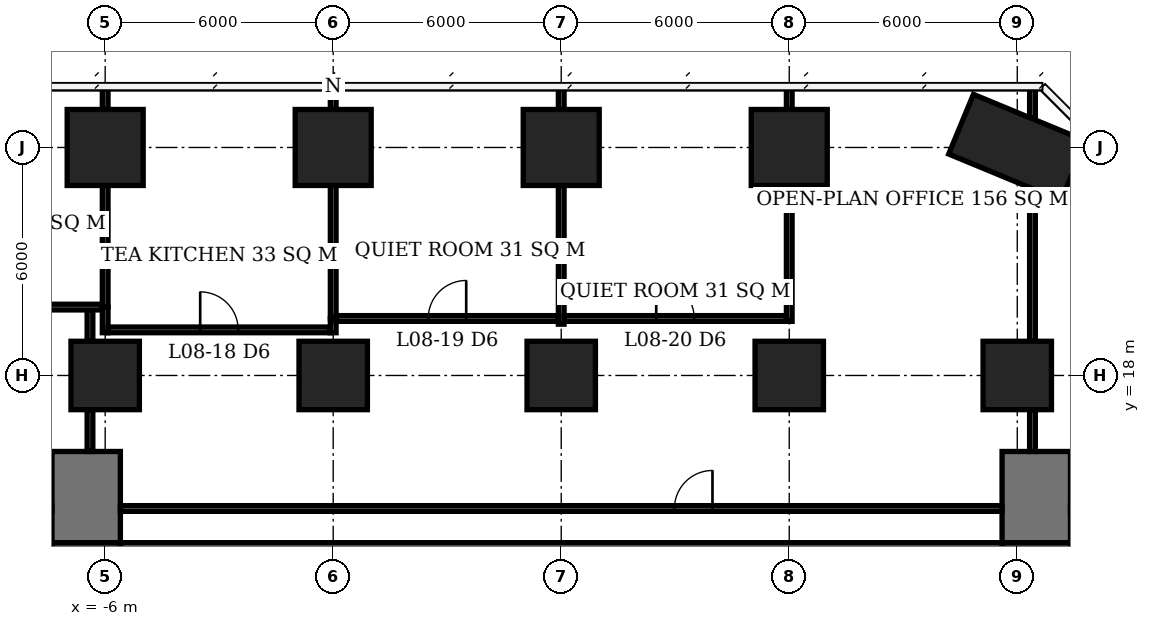
"""IFC4 building model, lengths in metres.
Left out: names, types, materials, properties, quantities, classifications, styles, units other than length and angle.
Written with IfcOpenShell. Run it as: python <this file> out.ifc"""

import sys

from ifc_helpers import new_model, si_unit, direction, frame, frame_2d, origin, origin_2d, place, context, subcontext, project, spatial, rectangle, extrude, element, fill, save


model = new_model("IFC4")
c1 = context("Model", 3, precision=1e-05, world=origin(), true_north=direction((0.0, 1.0)))
c2 = subcontext(c1, "Body", "Model", "MODEL_VIEW")
j1 = project(units=[si_unit("LENGTHUNIT", "METRE"), si_unit("PLANEANGLEUNIT", "RADIAN")], contexts=[c1])
p1 = place(None, origin())
s1 = spatial("IfcSite", under=j1, at=p1, CompositionType="ELEMENT")
p2 = place(p1, origin())
s2 = spatial("IfcBuilding", under=s1, at=p2, CompositionType="ELEMENT")
p3 = place(p2, frame((0.0, 0.0, 37.7)))
s3 = spatial("IfcBuildingStorey", under=s2, at=p3, CompositionType="ELEMENT", Elevation=37.7)
p4 = place(p3, frame((-6.0, 18.0, 0.0), z_axis=(0.0, 0.0, 1.0), x_axis=(1.0, 0.0, 0.0)))
e1 = element("IfcColumn", 1, at=p4, inside=s3, PredefinedType="COLUMN", context=c2, shape_type="SweptSolid", body=[
    extrude(rectangle(XDim=1.8, YDim=1.8, at=origin_2d()), origin(), (0.0, 0.0, 1.0), 3.9),
])
p5 = place(p3, frame((-6.0, 24.0, 0.0), z_axis=(0.0, 0.0, 1.0), x_axis=(1.0, 0.0, 0.0)))
e2 = element("IfcColumn", 2, at=p5, inside=s3, PredefinedType="COLUMN", context=c2, shape_type="SweptSolid", body=[
    extrude(rectangle(XDim=2.0, YDim=2.0, at=origin_2d()), origin(), (0.0, 0.0, 1.0), 3.9),
])
p6 = place(p3, frame((0.0, 18.0, 0.0), z_axis=(0.0, 0.0, 1.0), x_axis=(1.0, 0.0, 0.0)))
e3 = element("IfcColumn", 3, at=p6, inside=s3, PredefinedType="COLUMN", context=c2, shape_type="SweptSolid", body=[
    extrude(rectangle(XDim=1.8, YDim=1.8, at=origin_2d()), origin(), (0.0, 0.0, 1.0), 3.9),
])
p7 = place(p3, frame((0.0, 24.0, 0.0), z_axis=(0.0, 0.0, 1.0), x_axis=(1.0, 0.0, 0.0)))
e4 = element("IfcColumn", 4, at=p7, inside=s3, PredefinedType="COLUMN", context=c2, shape_type="SweptSolid", body=[
    extrude(rectangle(XDim=2.0, YDim=2.0, at=origin_2d()), origin(), (0.0, 0.0, 1.0), 3.9),
])
p8 = place(p3, frame((6.0, 18.0, 0.0), z_axis=(0.0, 0.0, 1.0), x_axis=(1.0, 0.0, 0.0)))
e5 = element("IfcColumn", 5, at=p8, inside=s3, PredefinedType="COLUMN", context=c2, shape_type="SweptSolid", body=[
    extrude(rectangle(XDim=1.8, YDim=1.8, at=origin_2d()), origin(), (0.0, 0.0, 1.0), 3.9),
])
p9 = place(p3, frame((6.0, 24.0, 0.0), z_axis=(0.0, 0.0, 1.0), x_axis=(1.0, 0.0, 0.0)))
e6 = element("IfcColumn", 6, at=p9, inside=s3, PredefinedType="COLUMN", context=c2, shape_type="SweptSolid", body=[
    extrude(rectangle(XDim=2.0, YDim=2.0, at=origin_2d()), origin(), (0.0, 0.0, 1.0), 3.9),
])
p10 = place(p3, frame((12.0, 18.0, 0.0), z_axis=(0.0, 0.0, 1.0), x_axis=(1.0, 0.0, 0.0)))
e7 = element("IfcColumn", 7, at=p10, inside=s3, PredefinedType="COLUMN", context=c2, shape_type="SweptSolid", body=[
    extrude(rectangle(XDim=1.8, YDim=1.8, at=origin_2d()), origin(), (0.0, 0.0, 1.0), 3.9),
])
p11 = place(p3, frame((12.0, 24.0, 0.0), z_axis=(0.0, 0.0, 1.0), x_axis=(1.0, 0.0, 0.0)))
e8 = element("IfcColumn", 8, at=p11, inside=s3, PredefinedType="COLUMN", context=c2, shape_type="SweptSolid", body=[
    extrude(rectangle(XDim=2.0, YDim=2.0, at=origin_2d()), origin(), (0.0, 0.0, 1.0), 3.9),
])
p12 = place(p3, frame((18.0, 18.0, 0.0), z_axis=(0.0, 0.0, 1.0), x_axis=(1.0, 0.0, 0.0)))
e9 = element("IfcColumn", 9, at=p12, inside=s3, PredefinedType="COLUMN", context=c2, shape_type="SweptSolid", body=[
    extrude(rectangle(XDim=1.8, YDim=1.8, at=origin_2d()), origin(), (0.0, 0.0, 1.0), 3.9),
])
p13 = place(p3, frame((18.0, 24.0, 0.0), z_axis=(0.0, 0.0, 1.0), x_axis=(0.923879532511, -0.382683432365, 0.0)))
e10 = element("IfcColumn", 10, at=p13, inside=s3, PredefinedType="COLUMN", context=c2, shape_type="SweptSolid", body=[
    extrude(rectangle(XDim=3.2, YDim=1.7, at=origin_2d()), origin(), (0.0, 0.0, 1.0), 3.9),
])
p14 = place(p3, frame((-5.6, 12.6, 0.0), z_axis=(0.0, 0.0, 1.0), x_axis=(1.0, 0.0, 0.0)))
e11 = element("IfcWall", 11, at=p14, inside=s3, PredefinedType="SHEAR", context=c2, shape_type="SweptSolid", body=[
    extrude(rectangle(XDim=23.2, YDim=2.0, at=frame_2d((11.6, 0.0))), origin(), (0.0, 0.0, 1.0), 3.9),
])
p15 = place(p3, frame((-6.5, -7.6, 0.0), z_axis=(0.0, 0.0, 1.0), x_axis=(0.0, 1.0, 0.0)))
e12 = element("IfcWall", 12, at=p15, inside=s3, PredefinedType="SHEAR", context=c2, shape_type="SweptSolid", body=[
    extrude(rectangle(XDim=21.2, YDim=1.8, at=frame_2d((10.6, 0.0))), origin(), (0.0, 0.0, 1.0), 3.9),
])
p16 = place(p15, frame((7.8, 0.0, 0.0)))
e13 = element("IfcOpeningElement", 13, at=p16, cuts=e12, PredefinedType="OPENING", context=c2, shape_type="SweptSolid", body=[
    extrude(rectangle(XDim=1.8, YDim=2.4, at=frame_2d((0.9, 1.2))), frame((0.0, 0.91, 0.0), z_axis=(0.0, -1.0, 0.0), x_axis=(1.0, 0.0, 0.0)), (0.0, 0.0, 1.0), 1.82),
])
p17 = place(p3, frame((18.5, -7.6, 0.0), z_axis=(0.0, 0.0, 1.0), x_axis=(0.0, 1.0, 0.0)))
e14 = element("IfcWall", 14, at=p17, inside=s3, PredefinedType="SHEAR", context=c2, shape_type="SweptSolid", body=[
    extrude(rectangle(XDim=21.2, YDim=1.8, at=frame_2d((10.6, 0.0))), origin(), (0.0, 0.0, 1.0), 3.9),
])
p18 = place(p17, frame((9.2, 0.0, 0.0)))
e15 = element("IfcOpeningElement", 15, at=p18, cuts=e14, PredefinedType="OPENING", context=c2, shape_type="SweptSolid", body=[
    extrude(rectangle(XDim=1.8, YDim=2.4, at=frame_2d((0.9, 1.2))), frame((0.0, 0.91, 0.0), z_axis=(0.0, -1.0, 0.0), x_axis=(1.0, 0.0, 0.0)), (0.0, 0.0, 1.0), 1.82),
])
for number, where, z_axis, x_axis in (
    (16, (-6.5, 13.6, 0.0), (0.0, 0.0, 1.0), (0.0, 1.0, 0.0)),
    (17, (18.5, 13.6, 0.0), (0.0, 0.0, 1.0), (0.0, 1.0, 0.0)),
):
    element("IfcWall", number, at=place(p3, frame(where, z_axis=z_axis, x_axis=x_axis)), inside=s3, PredefinedType="SHEAR", context=c2, shape_type="SweptSolid", body=[
        extrude(rectangle(XDim=2.4, YDim=1.8, at=frame_2d((1.2, 0.0))), origin(), (0.0, 0.0, 1.0), 3.9),
    ])
p19 = place(p3, frame((-5.925, 19.2, 0.0), z_axis=(0.0, 0.0, 1.0), x_axis=(1.0, 0.0, 0.0)))
e18 = element("IfcWall", 18, at=p19, inside=s3, PredefinedType="PARTITIONING", context=c2, shape_type="SweptSolid", body=[
    extrude(rectangle(XDim=5.85, YDim=0.15, at=frame_2d((2.925, 0.0))), origin(), (0.0, 0.0, 1.0), 3.65),
])
p20 = place(p19, frame((2.425, 0.0, 0.0)))
e19 = element("IfcOpeningElement", 19, at=p20, cuts=e18, PredefinedType="OPENING", context=c2, shape_type="SweptSolid", body=[
    extrude(rectangle(XDim=1.0, YDim=2.1, at=frame_2d((0.5, 1.05))), frame((0.0, 0.085, 0.0), z_axis=(0.0, -1.0, 0.0), x_axis=(1.0, 0.0, 0.0)), (0.0, 0.0, 1.0), 0.17),
])
p21 = place(p3, frame((0.075, 19.5, 0.0), z_axis=(0.0, 0.0, 1.0), x_axis=(1.0, 0.0, 0.0)))
e20 = element("IfcWall", 20, at=p21, inside=s3, PredefinedType="PARTITIONING", context=c2, shape_type="SweptSolid", body=[
    extrude(rectangle(XDim=5.85, YDim=0.15, at=frame_2d((2.925, 0.0))), origin(), (0.0, 0.0, 1.0), 3.65),
])
p22 = place(p21, frame((2.425, 0.0, 0.0)))
e21 = element("IfcOpeningElement", 21, at=p22, cuts=e20, PredefinedType="OPENING", context=c2, shape_type="SweptSolid", body=[
    extrude(rectangle(XDim=1.0, YDim=2.1, at=frame_2d((0.5, 1.05))), frame((0.0, 0.085, 0.0), z_axis=(0.0, -1.0, 0.0), x_axis=(1.0, 0.0, 0.0)), (0.0, 0.0, 1.0), 0.17),
])
p23 = place(p3, frame((6.075, 19.5, 0.0), z_axis=(0.0, 0.0, 1.0), x_axis=(1.0, 0.0, 0.0)))
e22 = element("IfcWall", 22, at=p23, inside=s3, PredefinedType="PARTITIONING", context=c2, shape_type="SweptSolid", body=[
    extrude(rectangle(XDim=5.85, YDim=0.15, at=frame_2d((2.925, 0.0))), origin(), (0.0, 0.0, 1.0), 3.65),
])
p24 = place(p23, frame((2.425, 0.0, 0.0)))
e23 = element("IfcOpeningElement", 23, at=p24, cuts=e22, PredefinedType="OPENING", context=c2, shape_type="SweptSolid", body=[
    extrude(rectangle(XDim=1.0, YDim=2.1, at=frame_2d((0.5, 1.05))), frame((0.0, 0.085, 0.0), z_axis=(0.0, -1.0, 0.0), x_axis=(1.0, 0.0, 0.0)), (0.0, 0.0, 1.0), 0.17),
])
p25 = place(p3, frame((-11.925, 19.8, 0.0), z_axis=(0.0, 0.0, 1.0), x_axis=(1.0, 0.0, 0.0)))
e24 = element("IfcWall", 24, at=p25, inside=s3, PredefinedType="PARTITIONING", context=c2, shape_type="SweptSolid", body=[
    extrude(rectangle(XDim=5.85, YDim=0.15, at=frame_2d((2.925, 0.0))), origin(), (0.0, 0.0, 1.0), 3.65),
])
p26 = place(p25, frame((2.425, 0.0, 0.0)))
e25 = element("IfcOpeningElement", 25, at=p26, cuts=e24, PredefinedType="OPENING", context=c2, shape_type="SweptSolid", body=[
    extrude(rectangle(XDim=1.0, YDim=2.1, at=frame_2d((0.5, 1.05))), frame((0.0, 0.085, 0.0), z_axis=(0.0, -1.0, 0.0), x_axis=(1.0, 0.0, 0.0)), (0.0, 0.0, 1.0), 0.17),
])
p27 = place(p3, frame((-6.0, 19.125, 0.0), z_axis=(0.0, 0.0, 1.0), x_axis=(0.0, 1.0, 0.0)))
e26 = element("IfcWall", 26, at=p27, inside=s3, PredefinedType="PARTITIONING", context=c2, shape_type="SweptSolid", body=[
    extrude(rectangle(XDim=0.675, YDim=0.15, at=frame_2d((0.337, 0.0))), origin(), (0.0, 0.0, 1.0), 3.65),
])
p28 = place(p3, frame((-6.0, 19.8, 0.0), z_axis=(0.0, 0.0, 1.0), x_axis=(0.0, 1.0, 0.0)))
e27 = element("IfcWall", 27, at=p28, inside=s3, PredefinedType="PARTITIONING", context=c2, shape_type="SweptSolid", body=[
    extrude(rectangle(XDim=3.2, YDim=0.15, at=frame_2d((1.6, 0.0))), origin(), (0.0, 0.0, 1.0), 3.65),
])
p29 = place(p3, frame((-6.0, 25.0, 0.0), z_axis=(0.0, 0.0, 1.0), x_axis=(0.0, 1.0, 0.0)))
e28 = element("IfcWall", 28, at=p29, inside=s3, PredefinedType="PARTITIONING", context=c2, shape_type="SweptSolid", body=[
    extrude(rectangle(XDim=0.6, YDim=0.15, at=frame_2d((0.3, 0.0))), origin(), (0.0, 0.0, 1.0), 3.65),
])
p30 = place(p3, frame((0.0, 19.125, 0.0), z_axis=(0.0, 0.0, 1.0), x_axis=(0.0, 1.0, 0.0)))
e29 = element("IfcWall", 29, at=p30, inside=s3, PredefinedType="PARTITIONING", context=c2, shape_type="SweptSolid", body=[
    extrude(rectangle(XDim=0.375, YDim=0.15, at=frame_2d((0.188, 0.0))), origin(), (0.0, 0.0, 1.0), 3.65),
])
p31 = place(p3, frame((0.0, 19.5, 0.0), z_axis=(0.0, 0.0, 1.0), x_axis=(0.0, 1.0, 0.0)))
e30 = element("IfcWall", 30, at=p31, inside=s3, PredefinedType="PARTITIONING", context=c2, shape_type="SweptSolid", body=[
    extrude(rectangle(XDim=3.5, YDim=0.15, at=frame_2d((1.75, 0.0))), origin(), (0.0, 0.0, 1.0), 3.65),
])
p32 = place(p3, frame((0.0, 25.0, 0.0), z_axis=(0.0, 0.0, 1.0), x_axis=(0.0, 1.0, 0.0)))
e31 = element("IfcWall", 31, at=p32, inside=s3, PredefinedType="PARTITIONING", context=c2, shape_type="SweptSolid", body=[
    extrude(rectangle(XDim=0.55, YDim=0.15, at=frame_2d((0.275, 0.0))), origin(), (0.0, 0.0, 1.0), 3.65),
])
p33 = place(p3, frame((6.0, 19.35, 0.0), z_axis=(0.0, 0.0, 1.0), x_axis=(0.0, 1.0, 0.0)))
e32 = element("IfcWall", 32, at=p33, inside=s3, PredefinedType="PARTITIONING", context=c2, shape_type="SweptSolid", body=[
    extrude(rectangle(XDim=3.65, YDim=0.15, at=frame_2d((1.825, 0.0))), origin(), (0.0, 0.0, 1.0), 3.65),
])
p34 = place(p3, frame((6.0, 25.0, 0.0), z_axis=(0.0, 0.0, 1.0), x_axis=(0.0, 1.0, 0.0)))
e33 = element("IfcWall", 33, at=p34, inside=s3, PredefinedType="PARTITIONING", context=c2, shape_type="SweptSolid", body=[
    extrude(rectangle(XDim=0.6, YDim=0.15, at=frame_2d((0.3, 0.0))), origin(), (0.0, 0.0, 1.0), 3.65),
])
p35 = place(p3, frame((12.0, 19.425, 0.0), z_axis=(0.0, 0.0, 1.0), x_axis=(0.0, 1.0, 0.0)))
e34 = element("IfcWall", 34, at=p35, inside=s3, PredefinedType="PARTITIONING", context=c2, shape_type="SweptSolid", body=[
    extrude(rectangle(XDim=3.575, YDim=0.15, at=frame_2d((1.788, 0.0))), origin(), (0.0, 0.0, 1.0), 3.65),
])
p36 = place(p3, frame((12.0, 25.0, 0.0), z_axis=(0.0, 0.0, 1.0), x_axis=(0.0, 1.0, 0.0)))
e35 = element("IfcWall", 35, at=p36, inside=s3, PredefinedType="PARTITIONING", context=c2, shape_type="SweptSolid", body=[
    extrude(rectangle(XDim=0.6, YDim=0.15, at=frame_2d((0.3, 0.0))), origin(), (0.0, 0.0, 1.0), 3.65),
])
p37 = place(p3, frame((-6.4, 16.0, 0.0), z_axis=(0.0, 0.0, 1.0), x_axis=(0.0, 1.0, 0.0)))
e36 = element("IfcWall", 36, at=p37, inside=s3, PredefinedType="PARTITIONING", context=c2, shape_type="SweptSolid", body=[
    extrude(rectangle(XDim=1.1, YDim=0.15, at=frame_2d((0.55, 0.0))), origin(), (0.0, 0.0, 1.0), 3.65),
])
p38 = place(p3, frame((-6.4, 18.9, 0.0), z_axis=(0.0, 0.0, 1.0), x_axis=(0.0, 1.0, 0.0)))
e37 = element("IfcWall", 37, at=p38, inside=s3, PredefinedType="PARTITIONING", context=c2, shape_type="SweptSolid", body=[
    extrude(rectangle(XDim=0.825, YDim=0.15, at=frame_2d((0.413, 0.0))), origin(), (0.0, 0.0, 1.0), 3.65),
])
p39 = place(p3, frame((-5.6, 14.5, 0.0), z_axis=(0.0, 0.0, 1.0), x_axis=(1.0, 0.0, 0.0)))
e38 = element("IfcWall", 38, at=p39, inside=s3, PredefinedType="PARTITIONING", context=c2, shape_type="SweptSolid", body=[
    extrude(rectangle(XDim=23.2, YDim=0.15, at=frame_2d((11.6, 0.0))), origin(), (0.0, 0.0, 1.0), 3.65),
])
p40 = place(p39, frame((14.58, 0.0, 0.0)))
e39 = element("IfcOpeningElement", 39, at=p40, cuts=e38, PredefinedType="OPENING", context=c2, shape_type="SweptSolid", body=[
    extrude(rectangle(XDim=1.0, YDim=2.1, at=frame_2d((0.5, 1.05))), frame((0.0, 0.085, 0.0), z_axis=(0.0, -1.0, 0.0), x_axis=(1.0, 0.0, 0.0)), (0.0, 0.0, 1.0), 0.17),
])
p41 = place(p3, frame((18.4, 16.0, 0.0), z_axis=(0.0, 0.0, 1.0), x_axis=(0.0, 1.0, 0.0)))
e40 = element("IfcWall", 40, at=p41, inside=s3, PredefinedType="PARTITIONING", context=c2, shape_type="SweptSolid", body=[
    extrude(rectangle(XDim=1.1, YDim=0.15, at=frame_2d((0.55, 0.0))), origin(), (0.0, 0.0, 1.0), 3.65),
])
p42 = place(p3, frame((18.4, 18.9, 0.0), z_axis=(0.0, 0.0, 1.0), x_axis=(0.0, 1.0, 0.0)))
e41 = element("IfcWall", 41, at=p42, inside=s3, PredefinedType="PARTITIONING", context=c2, shape_type="SweptSolid", body=[
    extrude(rectangle(XDim=3.983, YDim=0.15, at=frame_2d((1.992, 0.0))), origin(), (0.0, 0.0, 1.0), 3.65),
])
p43 = place(p3, frame((18.4, 24.785, 0.0), z_axis=(0.0, 0.0, 1.0), x_axis=(0.0, 1.0, 0.0)))
e42 = element("IfcWall", 42, at=p43, inside=s3, PredefinedType="PARTITIONING", context=c2, shape_type="SweptSolid", body=[
    extrude(rectangle(XDim=0.815, YDim=0.15, at=frame_2d((0.407, 0.0))), origin(), (0.0, 0.0, 1.0), 3.65),
])
p44 = place(p3, frame((19.4, 14.5, 0.0), z_axis=(0.0, 0.0, 1.0), x_axis=(1.0, 0.0, 0.0)))
e43 = element("IfcWall", 43, at=p44, inside=s3, PredefinedType="PARTITIONING", context=c2, shape_type="SweptSolid", body=[
    extrude(rectangle(XDim=1.175, YDim=0.15, at=frame_2d((0.587, 0.0))), origin(), (0.0, 0.0, 1.0), 3.65),
])
p45 = place(p20, origin())
e44 = element("IfcDoor", 44, at=p45, inside=s3, OperationType="SINGLE_SWING_LEFT", PredefinedType="DOOR", context=c2, shape_type="SweptSolid", body=[
    extrude(rectangle(XDim=1.0, YDim=2.1, at=frame_2d((0.5, 1.05))), frame((0.0, 0.025, 0.0), z_axis=(0.0, -1.0, 0.0), x_axis=(1.0, 0.0, 0.0)), (0.0, 0.0, 1.0), 0.05),
])
fill(e19, e44)
p46 = place(p22, origin())
e45 = element("IfcDoor", 45, at=p46, inside=s3, OperationType="SINGLE_SWING_RIGHT", PredefinedType="DOOR", context=c2, shape_type="SweptSolid", body=[
    extrude(rectangle(XDim=1.0, YDim=2.1, at=frame_2d((0.5, 1.05))), frame((0.0, 0.025, 0.0), z_axis=(0.0, -1.0, 0.0), x_axis=(1.0, 0.0, 0.0)), (0.0, 0.0, 1.0), 0.05),
])
fill(e21, e45)
p47 = place(p24, origin())
e46 = element("IfcDoor", 46, at=p47, inside=s3, OperationType="SINGLE_SWING_LEFT", PredefinedType="DOOR", context=c2, shape_type="SweptSolid", body=[
    extrude(rectangle(XDim=1.0, YDim=2.1, at=frame_2d((0.5, 1.05))), frame((0.0, 0.025, 0.0), z_axis=(0.0, -1.0, 0.0), x_axis=(1.0, 0.0, 0.0)), (0.0, 0.0, 1.0), 0.05),
])
fill(e23, e46)
p48 = place(p40, origin())
e47 = element("IfcDoor", 47, at=p48, inside=s3, OperationType="SINGLE_SWING_RIGHT", PredefinedType="DOOR", context=c2, shape_type="SweptSolid", body=[
    extrude(rectangle(XDim=1.0, YDim=2.1, at=frame_2d((0.5, 1.05))), frame((0.0, 0.025, 0.0), z_axis=(0.0, -1.0, 0.0), x_axis=(1.0, 0.0, 0.0)), (0.0, 0.0, 1.0), 0.05),
])
fill(e39, e47)
save(model, sys.argv[1])
